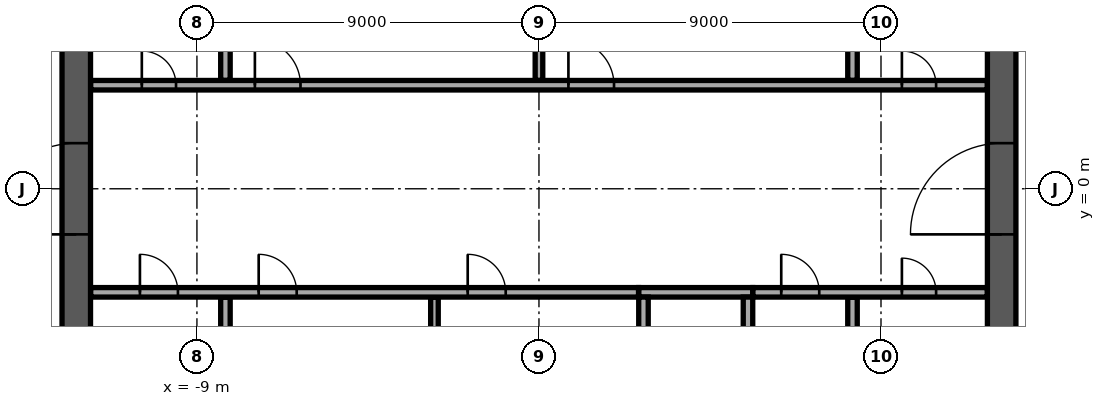
"""IFC4 building model, lengths in metres.
Left out: names, types, materials, properties, quantities, classifications, styles, units other than length and angle.
Written with IfcOpenShell. Run it as: python <this file> out.ifc"""

import sys

from ifc_helpers import new_model, si_unit, direction, frame, frame_2d, origin, place, context, subcontext, project, spatial, rectangle, extrude, element, fill, save


model = new_model("IFC4")
c1 = context("Model", 3, precision=1e-05, world=origin(), true_north=direction((0.0, 1.0)))
c2 = subcontext(c1, "Body", "Model", "MODEL_VIEW")
j1 = project(units=[si_unit("LENGTHUNIT", "METRE"), si_unit("PLANEANGLEUNIT", "RADIAN")], contexts=[c1])
p1 = place(None, origin())
s1 = spatial("IfcSite", under=j1, at=p1, CompositionType="ELEMENT")
p2 = place(p1, origin())
s2 = spatial("IfcBuilding", under=s1, at=p2, CompositionType="ELEMENT")
p3 = place(p2, frame((0.0, 0.0, 290.9)))
s3 = spatial("IfcBuildingStorey", under=s2, at=p3, CompositionType="ELEMENT", Elevation=290.9)
p4 = place(p3, frame((12.175, -11.8, 0.0), z_axis=(0.0, 0.0, 1.0), x_axis=(0.0, 1.0, 0.0)))
e1 = element("IfcWall", 1, at=p4, inside=s3, PredefinedType="SHEAR", context=c2, shape_type="SweptSolid", body=[
    extrude(rectangle(XDim=23.6, YDim=0.75, at=frame_2d((11.8, 0.0))), origin(), (0.0, 0.0, 1.0), 5.25),
])
p5 = place(p4, frame((10.6, 0.0, 0.0)))
e2 = element("IfcOpeningElement", 2, at=p5, cuts=e1, PredefinedType="OPENING", context=c2, shape_type="SweptSolid", body=[
    extrude(rectangle(XDim=2.4, YDim=2.4, at=frame_2d((1.2, 1.2))), frame((0.0, 0.385, 0.0), z_axis=(0.0, -1.0, 0.0), x_axis=(1.0, 0.0, 0.0)), (0.0, 0.0, 1.0), 0.77),
])
p6 = place(p3, frame((-12.175, -11.8, 0.0), z_axis=(0.0, 0.0, 1.0), x_axis=(0.0, 1.0, 0.0)))
e3 = element("IfcWall", 3, at=p6, inside=s3, PredefinedType="SHEAR", context=c2, shape_type="SweptSolid", body=[
    extrude(rectangle(XDim=23.6, YDim=0.75, at=frame_2d((11.8, 0.0))), origin(), (0.0, 0.0, 1.0), 5.25),
])
p7 = place(p6, frame((10.6, 0.0, 0.0)))
e4 = element("IfcOpeningElement", 4, at=p7, cuts=e3, PredefinedType="OPENING", context=c2, shape_type="SweptSolid", body=[
    extrude(rectangle(XDim=2.4, YDim=2.4, at=frame_2d((1.2, 1.2))), frame((0.0, 0.385, 0.0), z_axis=(0.0, -1.0, 0.0), x_axis=(1.0, 0.0, 0.0)), (0.0, 0.0, 1.0), 0.77),
])
p8 = place(p3, frame((2.625, -2.725, 0.0), z_axis=(0.0, 0.0, 1.0), x_axis=(1.0, 0.0, 0.0)))
e5 = element("IfcWall", 5, at=p8, inside=s3, PredefinedType="SOLIDWALL", context=c2, shape_type="SweptSolid", body=[
    extrude(rectangle(XDim=3.0, YDim=0.25, at=frame_2d((1.5, 0.0))), origin(), (0.0, 0.0, 1.0), 5.25),
])
for number, where, z_axis, x_axis in (
    (6, (2.75, -5.55, 0.0), (0.0, 0.0, 1.0), (0.0, 1.0, 0.0)),
    (7, (5.5, -5.55, 0.0), (0.0, 0.0, 1.0), (0.0, 1.0, 0.0)),
):
    element("IfcWall", number, at=place(p3, frame(where, z_axis=z_axis, x_axis=x_axis)), inside=s3, PredefinedType="SOLIDWALL", context=c2, shape_type="SweptSolid", body=[
        extrude(rectangle(XDim=2.7, YDim=0.25, at=frame_2d((1.35, 0.0))), origin(), (0.0, 0.0, 1.0), 5.25),
    ])
p9 = place(p3, frame((-8.25, -5.545, 0.0), z_axis=(0.0, 0.0, 1.0), x_axis=(0.0, 1.0, 0.0)))
e8 = element("IfcWall", 8, at=p9, inside=s3, PredefinedType="PARTITIONING", context=c2, shape_type="SweptSolid", body=[
    extrude(rectangle(XDim=2.69, YDim=0.25, at=frame_2d((1.345, 0.0))), origin(), (0.0, 0.0, 1.0), 5.25),
])
p10 = place(p3, frame((-2.75, -5.545, 0.0), z_axis=(0.0, 0.0, 1.0), x_axis=(0.0, 1.0, 0.0)))
e9 = element("IfcWall", 9, at=p10, inside=s3, PredefinedType="PARTITIONING", context=c2, shape_type="SweptSolid", body=[
    extrude(rectangle(XDim=2.69, YDim=0.2, at=frame_2d((1.345, 0.0))), origin(), (0.0, 0.0, 1.0), 5.25),
])
p11 = place(p3, frame((8.25, -5.545, 0.0), z_axis=(0.0, 0.0, 1.0), x_axis=(0.0, 1.0, 0.0)))
e10 = element("IfcWall", 10, at=p11, inside=s3, PredefinedType="PARTITIONING", context=c2, shape_type="SweptSolid", body=[
    extrude(rectangle(XDim=2.69, YDim=0.25, at=frame_2d((1.345, 0.0))), origin(), (0.0, 0.0, 1.0), 5.25),
])
p12 = place(p3, frame((-11.795, -2.725, 0.0), z_axis=(0.0, 0.0, 1.0), x_axis=(1.0, 0.0, 0.0)))
e11 = element("IfcWall", 11, at=p12, inside=s3, PredefinedType="PARTITIONING", context=c2, shape_type="SweptSolid", body=[
    extrude(rectangle(XDim=14.415, YDim=0.25, at=frame_2d((7.208, 0.0))), origin(), (0.0, 0.0, 1.0), 5.25),
])
p13 = place(p12, frame((1.295, 0.0, 0.0)))
e12 = element("IfcOpeningElement", 12, at=p13, cuts=e11, PredefinedType="OPENING", context=c2, shape_type="SweptSolid", body=[
    extrude(rectangle(XDim=1.0, YDim=2.1, at=frame_2d((0.5, 1.05))), frame((0.0, 0.135, 0.0), z_axis=(0.0, -1.0, 0.0), x_axis=(1.0, 0.0, 0.0)), (0.0, 0.0, 1.0), 0.27),
])
p14 = place(p12, frame((4.42, 0.0, 0.0)))
e13 = element("IfcOpeningElement", 13, at=p14, cuts=e11, PredefinedType="OPENING", context=c2, shape_type="SweptSolid", body=[
    extrude(rectangle(XDim=1.0, YDim=2.1, at=frame_2d((0.5, 1.05))), frame((0.0, 0.135, 0.0), z_axis=(0.0, -1.0, 0.0), x_axis=(1.0, 0.0, 0.0)), (0.0, 0.0, 1.0), 0.27),
])
p15 = place(p12, frame((9.92, 0.0, 0.0)))
e14 = element("IfcOpeningElement", 14, at=p15, cuts=e11, PredefinedType="OPENING", context=c2, shape_type="SweptSolid", body=[
    extrude(rectangle(XDim=1.0, YDim=2.1, at=frame_2d((0.5, 1.05))), frame((0.0, 0.135, 0.0), z_axis=(0.0, -1.0, 0.0), x_axis=(1.0, 0.0, 0.0)), (0.0, 0.0, 1.0), 0.27),
])
p16 = place(p3, frame((5.63, -2.725, 0.0), z_axis=(0.0, 0.0, 1.0), x_axis=(1.0, 0.0, 0.0)))
e15 = element("IfcWall", 15, at=p16, inside=s3, PredefinedType="PARTITIONING", context=c2, shape_type="SweptSolid", body=[
    extrude(rectangle(XDim=6.165, YDim=0.25, at=frame_2d((3.083, 0.0))), origin(), (0.0, 0.0, 1.0), 5.25),
])
p17 = place(p16, frame((0.745, 0.0, 0.0)))
e16 = element("IfcOpeningElement", 16, at=p17, cuts=e15, PredefinedType="OPENING", context=c2, shape_type="SweptSolid", body=[
    extrude(rectangle(XDim=1.0, YDim=2.1, at=frame_2d((0.5, 1.05))), frame((0.0, 0.135, 0.0), z_axis=(0.0, -1.0, 0.0), x_axis=(1.0, 0.0, 0.0)), (0.0, 0.0, 1.0), 0.27),
])
p18 = place(p16, frame((3.92, 0.0, 0.0)))
e17 = element("IfcOpeningElement", 17, at=p18, cuts=e15, PredefinedType="OPENING", context=c2, shape_type="SweptSolid", body=[
    extrude(rectangle(XDim=0.9, YDim=2.1, at=frame_2d((0.45, 1.05))), frame((0.0, 0.135, 0.0), z_axis=(0.0, -1.0, 0.0), x_axis=(1.0, 0.0, 0.0)), (0.0, 0.0, 1.0), 0.27),
])
p19 = place(p3, frame((-11.795, 2.725, 0.0), z_axis=(0.0, 0.0, 1.0), x_axis=(1.0, 0.0, 0.0)))
e18 = element("IfcWall", 18, at=p19, inside=s3, PredefinedType="PARTITIONING", context=c2, shape_type="SweptSolid", body=[
    extrude(rectangle(XDim=23.59, YDim=0.25, at=frame_2d((11.795, 0.0))), origin(), (0.0, 0.0, 1.0), 5.25),
])
p20 = place(p19, frame((21.345, 0.0, 0.0)))
e19 = element("IfcOpeningElement", 19, at=p20, cuts=e18, PredefinedType="OPENING", context=c2, shape_type="SweptSolid", body=[
    extrude(rectangle(XDim=0.9, YDim=2.1, at=frame_2d((0.45, 1.05))), frame((0.0, 0.135, 0.0), z_axis=(0.0, -1.0, 0.0), x_axis=(1.0, 0.0, 0.0)), (0.0, 0.0, 1.0), 0.27),
])
p21 = place(p19, frame((1.345, 0.0, 0.0)))
e20 = element("IfcOpeningElement", 20, at=p21, cuts=e18, PredefinedType="OPENING", context=c2, shape_type="SweptSolid", body=[
    extrude(rectangle(XDim=0.9, YDim=2.1, at=frame_2d((0.45, 1.05))), frame((0.0, 0.135, 0.0), z_axis=(0.0, -1.0, 0.0), x_axis=(1.0, 0.0, 0.0)), (0.0, 0.0, 1.0), 0.27),
])
p22 = place(p19, frame((4.32, 0.0, 0.0)))
e21 = element("IfcOpeningElement", 21, at=p22, cuts=e18, PredefinedType="OPENING", context=c2, shape_type="SweptSolid", body=[
    extrude(rectangle(XDim=1.2, YDim=2.1, at=frame_2d((0.6, 1.05))), frame((0.0, 0.135, 0.0), z_axis=(0.0, -1.0, 0.0), x_axis=(1.0, 0.0, 0.0)), (0.0, 0.0, 1.0), 0.27),
])
p23 = place(p19, frame((12.57, 0.0, 0.0)))
e22 = element("IfcOpeningElement", 22, at=p23, cuts=e18, PredefinedType="OPENING", context=c2, shape_type="SweptSolid", body=[
    extrude(rectangle(XDim=1.2, YDim=2.1, at=frame_2d((0.6, 1.05))), frame((0.0, 0.135, 0.0), z_axis=(0.0, -1.0, 0.0), x_axis=(1.0, 0.0, 0.0)), (0.0, 0.0, 1.0), 0.27),
])
p24 = place(p3, frame((-8.25, 2.855, 0.0), z_axis=(0.0, 0.0, 1.0), x_axis=(0.0, 1.0, 0.0)))
e23 = element("IfcWall", 23, at=p24, inside=s3, PredefinedType="PARTITIONING", context=c2, shape_type="SweptSolid", body=[
    extrude(rectangle(XDim=1.715, YDim=0.25, at=frame_2d((0.857, 0.0))), origin(), (0.0, 0.0, 1.0), 5.25),
])
p25 = place(p3, frame((0.0, 2.855, 0.0), z_axis=(0.0, 0.0, 1.0), x_axis=(0.0, 1.0, 0.0)))
e24 = element("IfcWall", 24, at=p25, inside=s3, PredefinedType="PARTITIONING", context=c2, shape_type="SweptSolid", body=[
    extrude(rectangle(XDim=2.69, YDim=0.2, at=frame_2d((1.345, 0.0))), origin(), (0.0, 0.0, 1.0), 5.25),
])
p26 = place(p3, frame((8.25, 2.855, 0.0), z_axis=(0.0, 0.0, 1.0), x_axis=(0.0, 1.0, 0.0)))
e25 = element("IfcWall", 25, at=p26, inside=s3, PredefinedType="PARTITIONING", context=c2, shape_type="SweptSolid", body=[
    extrude(rectangle(XDim=2.69, YDim=0.25, at=frame_2d((1.345, 0.0))), origin(), (0.0, 0.0, 1.0), 5.25),
])
p27 = place(p3, frame((-10.854, 32.094, 0.0), z_axis=(0.0, 0.0, 1.0), x_axis=(-0.422619760964, -0.906307087936, 0.0)))
e26 = element("IfcWall", 26, at=p27, inside=s3, PredefinedType="STANDARD", context=c2, shape_type="SweptSolid", body=[
    extrude(rectangle(XDim=32.447, YDim=0.6, at=frame_2d((16.223, 0.0))), origin(), (0.0, 0.0, 1.0), 5.25),
])
p28 = place(p27, frame((1.22, 0.0, 0.6)))
e27 = element("IfcOpeningElement", 27, at=p28, cuts=e26, PredefinedType="OPENING", context=c2, shape_type="SweptSolid", body=[
    extrude(rectangle(XDim=2.0, YDim=4.2, at=frame_2d((1.0, 2.1))), frame((0.0, 0.31, 0.0), z_axis=(0.0, -1.0, 0.0), x_axis=(1.0, 0.0, 0.0)), (0.0, 0.0, 1.0), 0.62),
])
p29 = place(p3, frame((10.92, -31.952, 0.0), z_axis=(0.0, 0.0, 1.0), x_axis=(0.422622196878, 0.906305952042, 0.0)))
e28 = element("IfcWall", 28, at=p29, inside=s3, PredefinedType="STANDARD", context=c2, shape_type="SweptSolid", body=[
    extrude(rectangle(XDim=32.29, YDim=0.6, at=frame_2d((16.145, 0.0))), origin(), (0.0, 0.0, 1.0), 5.25),
])
p30 = place(p29, frame((1.213, 0.0, 0.6)))
e29 = element("IfcOpeningElement", 29, at=p30, cuts=e28, PredefinedType="OPENING", context=c2, shape_type="SweptSolid", body=[
    extrude(rectangle(XDim=2.0, YDim=4.2, at=frame_2d((1.0, 2.1))), frame((0.0, 0.31, 0.0), z_axis=(0.0, -1.0, 0.0), x_axis=(1.0, 0.0, 0.0)), (0.0, 0.0, 1.0), 0.62),
])
p31 = place(p5, origin())
e30 = element("IfcDoor", 30, at=p31, inside=s3, OperationType="SINGLE_SWING_LEFT", PredefinedType="DOOR", context=c2, shape_type="SweptSolid", body=[
    extrude(rectangle(XDim=2.4, YDim=2.4, at=frame_2d((1.2, 1.2))), frame((0.0, 0.025, 0.0), z_axis=(0.0, -1.0, 0.0), x_axis=(1.0, 0.0, 0.0)), (0.0, 0.0, 1.0), 0.05),
])
fill(e2, e30)
p32 = place(p7, origin())
e31 = element("IfcDoor", 31, at=p32, inside=s3, OperationType="SINGLE_SWING_LEFT", PredefinedType="DOOR", context=c2, shape_type="SweptSolid", body=[
    extrude(rectangle(XDim=2.4, YDim=2.4, at=frame_2d((1.2, 1.2))), frame((0.0, 0.025, 0.0), z_axis=(0.0, -1.0, 0.0), x_axis=(1.0, 0.0, 0.0)), (0.0, 0.0, 1.0), 0.05),
])
fill(e4, e31)
p33 = place(p13, origin())
e32 = element("IfcDoor", 32, at=p33, inside=s3, OperationType="SINGLE_SWING_RIGHT", PredefinedType="DOOR", context=c2, shape_type="SweptSolid", body=[
    extrude(rectangle(XDim=1.0, YDim=2.1, at=frame_2d((0.5, 1.05))), frame((0.0, 0.025, 0.0), z_axis=(0.0, -1.0, 0.0), x_axis=(1.0, 0.0, 0.0)), (0.0, 0.0, 1.0), 0.05),
])
fill(e12, e32)
p34 = place(p17, origin())
e33 = element("IfcDoor", 33, at=p34, inside=s3, OperationType="SINGLE_SWING_RIGHT", PredefinedType="DOOR", context=c2, shape_type="SweptSolid", body=[
    extrude(rectangle(XDim=1.0, YDim=2.1, at=frame_2d((0.5, 1.05))), frame((0.0, 0.025, 0.0), z_axis=(0.0, -1.0, 0.0), x_axis=(1.0, 0.0, 0.0)), (0.0, 0.0, 1.0), 0.05),
])
fill(e16, e33)
p35 = place(p20, origin())
e34 = element("IfcDoor", 34, at=p35, inside=s3, OperationType="SINGLE_SWING_RIGHT", PredefinedType="DOOR", context=c2, shape_type="SweptSolid", body=[
    extrude(rectangle(XDim=0.9, YDim=2.1, at=frame_2d((0.45, 1.05))), frame((0.0, 0.025, 0.0), z_axis=(0.0, -1.0, 0.0), x_axis=(1.0, 0.0, 0.0)), (0.0, 0.0, 1.0), 0.05),
])
fill(e19, e34)
p36 = place(p18, origin())
e35 = element("IfcDoor", 35, at=p36, inside=s3, OperationType="SINGLE_SWING_RIGHT", PredefinedType="DOOR", context=c2, shape_type="SweptSolid", body=[
    extrude(rectangle(XDim=0.9, YDim=2.1, at=frame_2d((0.45, 1.05))), frame((0.0, 0.025, 0.0), z_axis=(0.0, -1.0, 0.0), x_axis=(1.0, 0.0, 0.0)), (0.0, 0.0, 1.0), 0.05),
])
fill(e17, e35)
p37 = place(p21, origin())
e36 = element("IfcDoor", 36, at=p37, inside=s3, OperationType="SINGLE_SWING_RIGHT", PredefinedType="DOOR", context=c2, shape_type="SweptSolid", body=[
    extrude(rectangle(XDim=0.9, YDim=2.1, at=frame_2d((0.45, 1.05))), frame((0.0, 0.025, 0.0), z_axis=(0.0, -1.0, 0.0), x_axis=(1.0, 0.0, 0.0)), (0.0, 0.0, 1.0), 0.05),
])
fill(e20, e36)
p38 = place(p22, origin())
e37 = element("IfcDoor", 37, at=p38, inside=s3, OperationType="SINGLE_SWING_LEFT", PredefinedType="DOOR", context=c2, shape_type="SweptSolid", body=[
    extrude(rectangle(XDim=1.2, YDim=2.1, at=frame_2d((0.6, 1.05))), frame((0.0, 0.025, 0.0), z_axis=(0.0, -1.0, 0.0), x_axis=(1.0, 0.0, 0.0)), (0.0, 0.0, 1.0), 0.05),
])
fill(e21, e37)
p39 = place(p23, origin())
e38 = element("IfcDoor", 38, at=p39, inside=s3, OperationType="SINGLE_SWING_LEFT", PredefinedType="DOOR", context=c2, shape_type="SweptSolid", body=[
    extrude(rectangle(XDim=1.2, YDim=2.1, at=frame_2d((0.6, 1.05))), frame((0.0, 0.025, 0.0), z_axis=(0.0, -1.0, 0.0), x_axis=(1.0, 0.0, 0.0)), (0.0, 0.0, 1.0), 0.05),
])
fill(e22, e38)
p40 = place(p14, origin())
e39 = element("IfcDoor", 39, at=p40, inside=s3, OperationType="SINGLE_SWING_RIGHT", PredefinedType="DOOR", context=c2, shape_type="SweptSolid", body=[
    extrude(rectangle(XDim=1.0, YDim=2.1, at=frame_2d((0.5, 1.05))), frame((0.0, 0.025, 0.0), z_axis=(0.0, -1.0, 0.0), x_axis=(1.0, 0.0, 0.0)), (0.0, 0.0, 1.0), 0.05),
])
fill(e13, e39)
p41 = place(p15, origin())
e40 = element("IfcDoor", 40, at=p41, inside=s3, OperationType="SINGLE_SWING_RIGHT", PredefinedType="DOOR", context=c2, shape_type="SweptSolid", body=[
    extrude(rectangle(XDim=1.0, YDim=2.1, at=frame_2d((0.5, 1.05))), frame((0.0, 0.025, 0.0), z_axis=(0.0, -1.0, 0.0), x_axis=(1.0, 0.0, 0.0)), (0.0, 0.0, 1.0), 0.05),
])
fill(e14, e40)
save(model, sys.argv[1])
